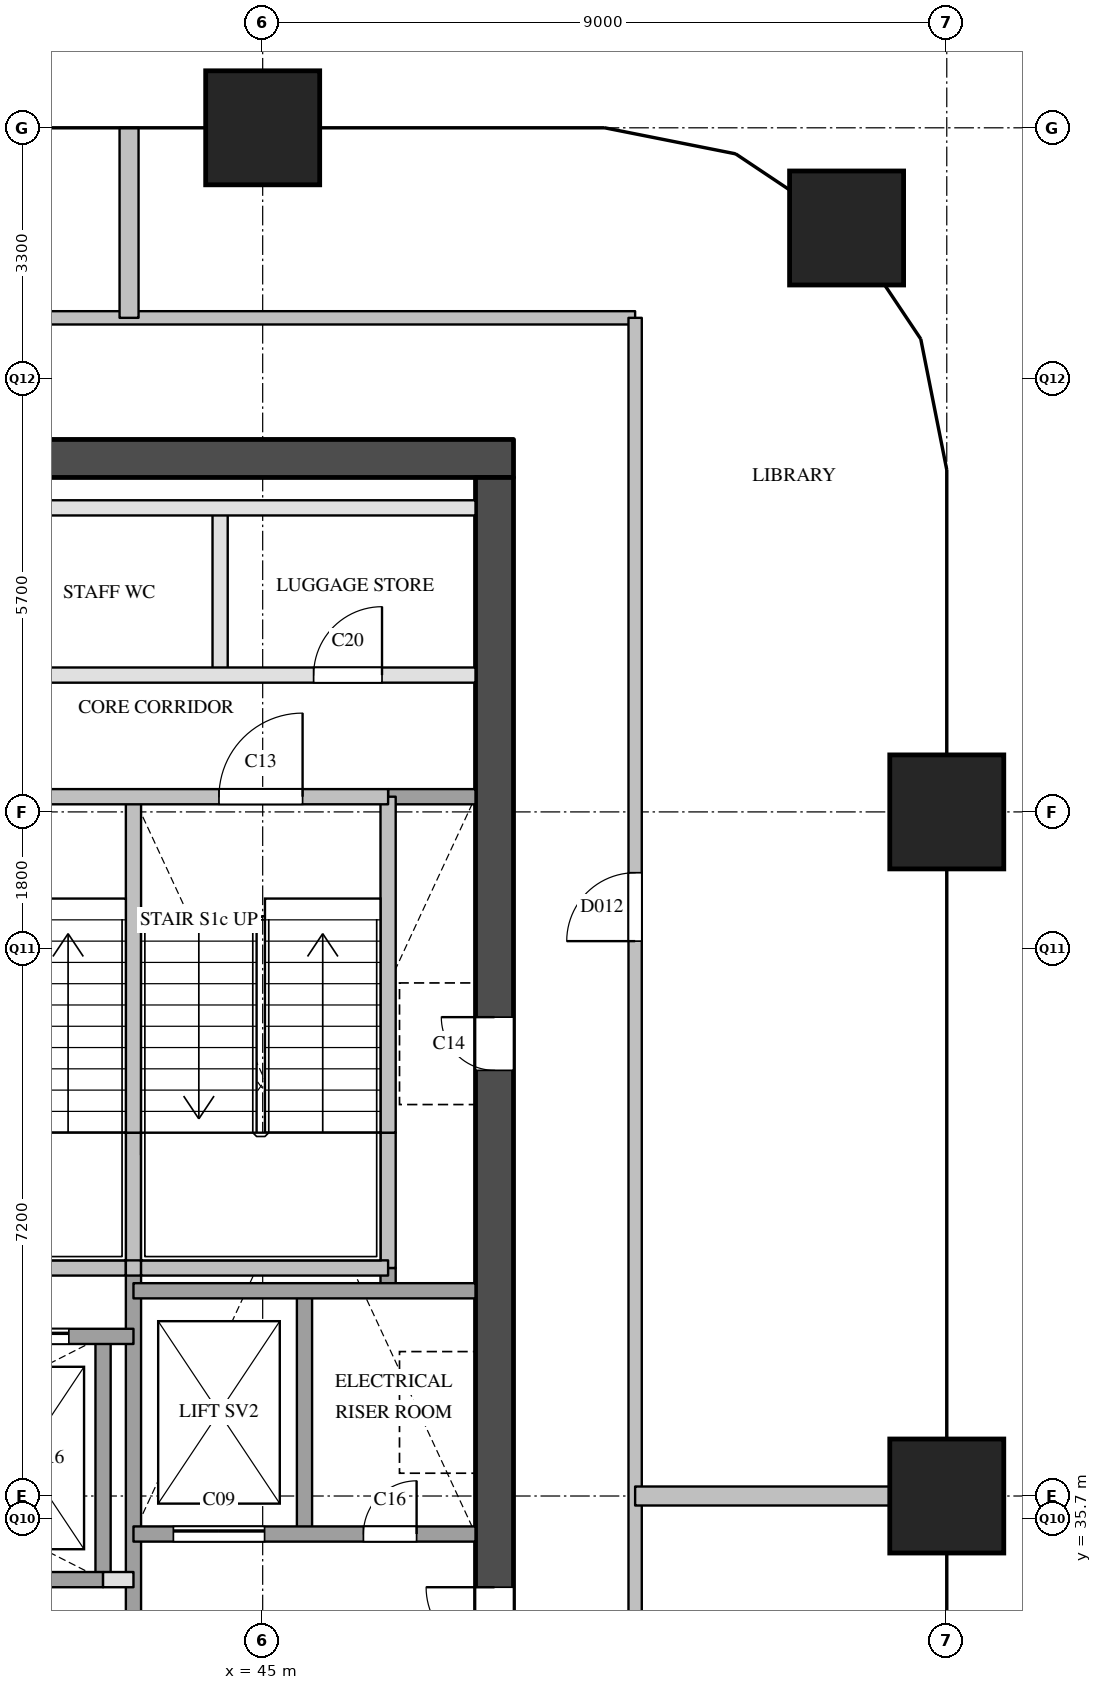
"""IFC4 building model, lengths in metres.
Left out: names, types, materials, properties, quantities, classifications, styles, units other than length and angle.
Written with IfcOpenShell. Run it as: python <this file> out.ifc"""

import sys

from ifc_helpers import new_model, si_unit, direction, frame, frame_2d, origin, origin_2d, place, context, subcontext, project, spatial, rectangle, extrude, element, fill, save


model = new_model("IFC4")
c1 = context("Model", 3, precision=1e-05, world=origin(), true_north=direction((0.0, 1.0)))
c2 = subcontext(c1, "Body", "Model", "MODEL_VIEW")
j1 = project(units=[si_unit("LENGTHUNIT", "METRE"), si_unit("PLANEANGLEUNIT", "RADIAN")], contexts=[c1])
p1 = place(None, origin())
s1 = spatial("IfcSite", under=j1, at=p1, CompositionType="ELEMENT")
p2 = place(p1, origin())
s2 = spatial("IfcBuilding", under=s1, at=p2, CompositionType="ELEMENT")
p3 = place(p2, frame((0.0, 0.0, 158.3)))
s3 = spatial("IfcBuildingStorey", under=s2, at=p3, CompositionType="ELEMENT", Elevation=158.3)
for number, where, z_axis, x_axis in (
    (1, (45.0, 54.0, 0.0), (0.0, 0.0, 1.0), (1.0, 0.0, 0.0)),
    (2, (54.0, 36.0, 0.0), (0.0, 0.0, 1.0), (1.0, 0.0, 0.0)),
    (3, (54.0, 45.0, 0.0), (0.0, 0.0, 1.0), (1.0, 0.0, 0.0)),
    (4, (52.682, 52.682, 0.0), (0.0, 0.0, 1.0), (1.0, 0.0, 0.0)),
):
    element("IfcColumn", number, at=place(p3, frame(where, z_axis=z_axis, x_axis=x_axis)), inside=s3, PredefinedType="COLUMN", context=c2, shape_type="SweptSolid", body=[
        extrude(rectangle(XDim=1.5, YDim=1.5, at=origin_2d()), origin(), (0.0, 0.0, 1.0), 3.9),
    ])
p4 = place(p3, frame((36.1, 49.65, 0.0), z_axis=(0.0, 0.0, 1.0), x_axis=(1.0, 0.0, 0.0)))
e5 = element("IfcWall", 5, at=p4, inside=s3, PredefinedType="SHEAR", context=c2, shape_type="SweptSolid", body=[
    extrude(rectangle(XDim=12.2, YDim=0.5, at=frame_2d((6.1, 0.0))), origin(), (0.0, 0.0, 1.0), 3.6),
])
p5 = place(p3, frame((48.05, 29.1, 0.0), z_axis=(0.0, 0.0, 1.0), x_axis=(0.0, 1.0, 0.0)))
e6 = element("IfcWall", 6, at=p5, inside=s3, PredefinedType="SHEAR", context=c2, shape_type="SweptSolid", body=[
    extrude(rectangle(XDim=20.3, YDim=0.5, at=frame_2d((10.15, 0.0))), origin(), (0.0, 0.0, 1.0), 3.6),
])
p6 = place(p5, frame((12.5, 0.0, 0.0)))
e7 = element("IfcOpeningElement", 7, at=p6, cuts=e6, PredefinedType="OPENING", context=c2, shape_type="SweptSolid", body=[
    extrude(rectangle(XDim=0.7, YDim=2.1, at=frame_2d((0.35, 1.05))), frame((0.0, 0.26, 0.0), z_axis=(0.0, -1.0, 0.0), x_axis=(1.0, 0.0, 0.0)), (0.0, 0.0, 1.0), 0.52),
])
p7 = place(p5, frame((3.9, 0.0, 0.0)))
e8 = element("IfcOpeningElement", 8, at=p7, cuts=e6, PredefinedType="OPENING", context=c2, shape_type="SweptSolid", body=[
    extrude(rectangle(XDim=1.8, YDim=2.1, at=frame_2d((0.9, 1.05))), frame((0.0, 0.26, 0.0), z_axis=(0.0, -1.0, 0.0), x_axis=(1.0, 0.0, 0.0)), (0.0, 0.0, 1.0), 0.52),
])
p8 = place(p3, frame((42.9, 34.9, 0.0), z_axis=(0.0, 0.0, 1.0), x_axis=(0.0, 1.0, 0.0)))
e9 = element("IfcWall", 9, at=p8, inside=s3, PredefinedType="SOLIDWALL", context=c2, shape_type="SweptSolid", body=[
    extrude(rectangle(XDim=3.2, YDim=0.2, at=frame_2d((1.6, 0.0))), origin(), (0.0, 0.0, 1.0), 3.6),
])
p9 = place(p3, frame((43.3, 29.1, 0.0), z_axis=(0.0, 0.0, 1.0), x_axis=(0.0, 1.0, 0.0)))
e10 = element("IfcWall", 10, at=p9, inside=s3, PredefinedType="SOLIDWALL", context=c2, shape_type="SweptSolid", body=[
    extrude(rectangle(XDim=9.9, YDim=0.2, at=frame_2d((4.95, 0.0))), origin(), (0.0, 0.0, 1.0), 3.6),
])
p10 = place(p3, frame((43.3, 39.0, 0.0), z_axis=(0.0, 0.0, 1.0), x_axis=(0.0, 1.0, 0.0)))
e11 = element("IfcWall", 11, at=p10, inside=s3, PredefinedType="SOLIDWALL", context=c2, shape_type="SweptSolid", body=[
    extrude(rectangle(XDim=1.78, YDim=0.2, at=frame_2d((0.89, 0.0))), origin(), (0.0, 0.0, 1.0), 3.6),
])
p11 = place(p3, frame((43.3, 40.78, 0.0), z_axis=(0.0, 0.0, 1.0), x_axis=(0.0, 1.0, 0.0)))
e12 = element("IfcWall", 12, at=p11, inside=s3, PredefinedType="SOLIDWALL", context=c2, shape_type="SweptSolid", body=[
    extrude(rectangle(XDim=4.42, YDim=0.2, at=frame_2d((2.21, 0.0))), origin(), (0.0, 0.0, 1.0), 3.6),
])
p12 = place(p3, frame((44.44, 46.8, 0.0), z_axis=(0.0, 0.0, 1.0), x_axis=(0.0, 1.0, 0.0)))
e13 = element("IfcWall", 13, at=p12, inside=s3, PredefinedType="PARTITIONING", context=c2, shape_type="SweptSolid", body=[
    extrude(rectangle(XDim=2.2, YDim=0.2, at=frame_2d((1.1, 0.0))), origin(), (0.0, 0.0, 1.0), 3.6),
])
p13 = place(p3, frame((45.55, 35.5, 0.0), z_axis=(0.0, 0.0, 1.0), x_axis=(0.0, 1.0, 0.0)))
e14 = element("IfcWall", 14, at=p13, inside=s3, PredefinedType="SOLIDWALL", context=c2, shape_type="SweptSolid", body=[
    extrude(rectangle(XDim=3.2, YDim=0.2, at=frame_2d((1.6, 0.0))), origin(), (0.0, 0.0, 1.0), 3.6),
])
p14 = place(p3, frame((46.65, 38.7, 0.0), z_axis=(0.0, 0.0, 1.0), x_axis=(0.0, 1.0, 0.0)))
e15 = element("IfcWall", 15, at=p14, inside=s3, PredefinedType="SOLIDWALL", context=c2, shape_type="SweptSolid", body=[
    extrude(rectangle(XDim=0.3, YDim=0.2, at=frame_2d((0.15, 0.0))), origin(), (0.0, 0.0, 1.0), 3.6),
])
p15 = place(p3, frame((46.65, 39.0, 0.0), z_axis=(0.0, 0.0, 1.0), x_axis=(0.0, 1.0, 0.0)))
e16 = element("IfcWall", 16, at=p15, inside=s3, PredefinedType="SOLIDWALL", context=c2, shape_type="SweptSolid", body=[
    extrude(rectangle(XDim=1.78, YDim=0.2, at=frame_2d((0.89, 0.0))), origin(), (0.0, 0.0, 1.0), 3.6),
])
p16 = place(p3, frame((46.65, 40.78, 0.0), z_axis=(0.0, 0.0, 1.0), x_axis=(0.0, 1.0, 0.0)))
e17 = element("IfcWall", 17, at=p16, inside=s3, PredefinedType="SOLIDWALL", context=c2, shape_type="SweptSolid", body=[
    extrude(rectangle(XDim=4.42, YDim=0.2, at=frame_2d((2.21, 0.0))), origin(), (0.0, 0.0, 1.0), 3.6),
])
p17 = place(p3, frame((42.9, 34.9, 0.0), z_axis=(0.0, 0.0, 1.0), x_axis=(1.0, 0.0, 0.0)))
e18 = element("IfcWall", 18, at=p17, inside=s3, PredefinedType="PARTITIONING", context=c2, shape_type="SweptSolid", body=[
    extrude(rectangle(XDim=0.4, YDim=0.2, at=frame_2d((0.2, 0.0))), origin(), (0.0, 0.0, 1.0), 3.6),
])
p18 = place(p3, frame((36.6, 34.9, 0.0), z_axis=(0.0, 0.0, 1.0), x_axis=(1.0, 0.0, 0.0)))
e19 = element("IfcWall", 19, at=p18, inside=s3, PredefinedType="SOLIDWALL", context=c2, shape_type="SweptSolid", body=[
    extrude(rectangle(XDim=6.3, YDim=0.2, at=frame_2d((3.15, 0.0))), origin(), (0.0, 0.0, 1.0), 3.6),
])
p19 = place(p3, frame((43.3, 35.5, 0.0), z_axis=(0.0, 0.0, 1.0), x_axis=(1.0, 0.0, 0.0)))
e20 = element("IfcWall", 20, at=p19, inside=s3, PredefinedType="SOLIDWALL", context=c2, shape_type="SweptSolid", body=[
    extrude(rectangle(XDim=4.5, YDim=0.2, at=frame_2d((2.25, 0.0))), origin(), (0.0, 0.0, 1.0), 3.6),
])
p20 = place(p19, frame((0.525, 0.0, 0.0)))
e21 = element("IfcOpeningElement", 21, at=p20, cuts=e20, PredefinedType="OPENING", context=c2, shape_type="SweptSolid", body=[
    extrude(rectangle(XDim=1.2, YDim=2.1, at=frame_2d((0.6, 1.05))), frame((0.0, 0.11, 0.0), z_axis=(0.0, -1.0, 0.0), x_axis=(1.0, 0.0, 0.0)), (0.0, 0.0, 1.0), 0.22),
])
p21 = place(p19, frame((3.025, 0.0, 0.0)))
e22 = element("IfcOpeningElement", 22, at=p21, cuts=e20, PredefinedType="OPENING", context=c2, shape_type="SweptSolid", body=[
    extrude(rectangle(XDim=0.7, YDim=2.1, at=frame_2d((0.35, 1.05))), frame((0.0, 0.11, 0.0), z_axis=(0.0, -1.0, 0.0), x_axis=(1.0, 0.0, 0.0)), (0.0, 0.0, 1.0), 0.22),
])
p22 = place(p3, frame((36.6, 38.1, 0.0), z_axis=(0.0, 0.0, 1.0), x_axis=(1.0, 0.0, 0.0)))
e23 = element("IfcWall", 23, at=p22, inside=s3, PredefinedType="SOLIDWALL", context=c2, shape_type="SweptSolid", body=[
    extrude(rectangle(XDim=6.7, YDim=0.2, at=frame_2d((3.35, 0.0))), origin(), (0.0, 0.0, 1.0), 3.6),
])
p23 = place(p22, frame((0.45, 0.0, 0.0)))
e24 = element("IfcOpeningElement", 24, at=p23, cuts=e23, PredefinedType="OPENING", context=c2, shape_type="SweptSolid", body=[
    extrude(rectangle(XDim=1.2, YDim=2.1, at=frame_2d((0.6, 1.05))), frame((0.0, 0.11, 0.0), z_axis=(0.0, -1.0, 0.0), x_axis=(1.0, 0.0, 0.0)), (0.0, 0.0, 1.0), 0.22),
])
p24 = place(p22, frame((2.55, 0.0, 0.0)))
e25 = element("IfcOpeningElement", 25, at=p24, cuts=e23, PredefinedType="OPENING", context=c2, shape_type="SweptSolid", body=[
    extrude(rectangle(XDim=1.2, YDim=2.1, at=frame_2d((0.6, 1.05))), frame((0.0, 0.11, 0.0), z_axis=(0.0, -1.0, 0.0), x_axis=(1.0, 0.0, 0.0)), (0.0, 0.0, 1.0), 0.22),
])
p25 = place(p22, frame((4.65, 0.0, 0.0)))
e26 = element("IfcOpeningElement", 26, at=p25, cuts=e23, PredefinedType="OPENING", context=c2, shape_type="SweptSolid", body=[
    extrude(rectangle(XDim=1.2, YDim=2.1, at=frame_2d((0.6, 1.05))), frame((0.0, 0.11, 0.0), z_axis=(0.0, -1.0, 0.0), x_axis=(1.0, 0.0, 0.0)), (0.0, 0.0, 1.0), 0.22),
])
p26 = place(p3, frame((43.3, 38.7, 0.0), z_axis=(0.0, 0.0, 1.0), x_axis=(1.0, 0.0, 0.0)))
e27 = element("IfcWall", 27, at=p26, inside=s3, PredefinedType="SOLIDWALL", context=c2, shape_type="SweptSolid", body=[
    extrude(rectangle(XDim=4.5, YDim=0.2, at=frame_2d((2.25, 0.0))), origin(), (0.0, 0.0, 1.0), 3.6),
])
p27 = place(p3, frame((40.05, 39.0, 0.0), z_axis=(0.0, 0.0, 1.0), x_axis=(1.0, 0.0, 0.0)))
e28 = element("IfcWall", 28, at=p27, inside=s3, PredefinedType="SOLIDWALL", context=c2, shape_type="SweptSolid", body=[
    extrude(rectangle(XDim=3.15, YDim=0.2, at=frame_2d((1.575, 0.0))), origin(), (0.0, 0.0, 1.0), 3.6),
])
p28 = place(p3, frame((43.2, 39.0, 0.0), z_axis=(0.0, 0.0, 1.0), x_axis=(1.0, 0.0, 0.0)))
e29 = element("IfcWall", 29, at=p28, inside=s3, PredefinedType="SOLIDWALL", context=c2, shape_type="SweptSolid", body=[
    extrude(rectangle(XDim=0.2, YDim=0.2, at=frame_2d((0.1, 0.0))), origin(), (0.0, 0.0, 1.0), 3.6),
])
p29 = place(p3, frame((43.4, 39.0, 0.0), z_axis=(0.0, 0.0, 1.0), x_axis=(1.0, 0.0, 0.0)))
e30 = element("IfcWall", 30, at=p29, inside=s3, PredefinedType="SOLIDWALL", context=c2, shape_type="SweptSolid", body=[
    extrude(rectangle(XDim=3.25, YDim=0.2, at=frame_2d((1.625, 0.0))), origin(), (0.0, 0.0, 1.0), 3.6),
])
p30 = place(p3, frame((46.65, 45.2, 0.0), z_axis=(0.0, 0.0, 1.0), x_axis=(1.0, 0.0, 0.0)))
e31 = element("IfcWall", 31, at=p30, inside=s3, PredefinedType="SOLIDWALL", context=c2, shape_type="SweptSolid", body=[
    extrude(rectangle(XDim=1.15, YDim=0.2, at=frame_2d((0.575, 0.0))), origin(), (0.0, 0.0, 1.0), 3.6),
])
p31 = place(p3, frame((36.6, 45.2, 0.0), z_axis=(0.0, 0.0, 1.0), x_axis=(1.0, 0.0, 0.0)))
e32 = element("IfcWall", 32, at=p31, inside=s3, PredefinedType="SOLIDWALL", context=c2, shape_type="SweptSolid", body=[
    extrude(rectangle(XDim=10.05, YDim=0.2, at=frame_2d((5.025, 0.0))), origin(), (0.0, 0.0, 1.0), 3.6),
])
p32 = place(p31, frame((1.125, 0.0, 0.0)))
e33 = element("IfcOpeningElement", 33, at=p32, cuts=e32, PredefinedType="OPENING", context=c2, shape_type="SweptSolid", body=[
    extrude(rectangle(XDim=1.1, YDim=2.1, at=frame_2d((0.55, 1.05))), frame((0.0, 0.11, 0.0), z_axis=(0.0, -1.0, 0.0), x_axis=(1.0, 0.0, 0.0)), (0.0, 0.0, 1.0), 0.22),
])
p33 = place(p31, frame((4.475, 0.0, 0.0)))
e34 = element("IfcOpeningElement", 34, at=p33, cuts=e32, PredefinedType="OPENING", context=c2, shape_type="SweptSolid", body=[
    extrude(rectangle(XDim=1.1, YDim=2.1, at=frame_2d((0.55, 1.05))), frame((0.0, 0.11, 0.0), z_axis=(0.0, -1.0, 0.0), x_axis=(1.0, 0.0, 0.0)), (0.0, 0.0, 1.0), 0.22),
])
p34 = place(p31, frame((7.825, 0.0, 0.0)))
e35 = element("IfcOpeningElement", 35, at=p34, cuts=e32, PredefinedType="OPENING", context=c2, shape_type="SweptSolid", body=[
    extrude(rectangle(XDim=1.1, YDim=2.1, at=frame_2d((0.55, 1.05))), frame((0.0, 0.11, 0.0), z_axis=(0.0, -1.0, 0.0), x_axis=(1.0, 0.0, 0.0)), (0.0, 0.0, 1.0), 0.22),
])
p35 = place(p3, frame((36.6, 46.8, 0.0), z_axis=(0.0, 0.0, 1.0), x_axis=(1.0, 0.0, 0.0)))
e36 = element("IfcWall", 36, at=p35, inside=s3, PredefinedType="PARTITIONING", context=c2, shape_type="SweptSolid", body=[
    extrude(rectangle(XDim=11.2, YDim=0.2, at=frame_2d((5.6, 0.0))), origin(), (0.0, 0.0, 1.0), 3.6),
])
p36 = place(p35, frame((0.67, 0.0, 0.0)))
e37 = element("IfcOpeningElement", 37, at=p36, cuts=e36, PredefinedType="OPENING", context=c2, shape_type="SweptSolid", body=[
    extrude(rectangle(XDim=0.9, YDim=2.1, at=frame_2d((0.45, 1.05))), frame((0.0, 0.11, 0.0), z_axis=(0.0, -1.0, 0.0), x_axis=(1.0, 0.0, 0.0)), (0.0, 0.0, 1.0), 0.22),
])
p37 = place(p35, frame((4.59, 0.0, 0.0)))
e38 = element("IfcOpeningElement", 38, at=p37, cuts=e36, PredefinedType="OPENING", context=c2, shape_type="SweptSolid", body=[
    extrude(rectangle(XDim=0.9, YDim=2.1, at=frame_2d((0.45, 1.05))), frame((0.0, 0.11, 0.0), z_axis=(0.0, -1.0, 0.0), x_axis=(1.0, 0.0, 0.0)), (0.0, 0.0, 1.0), 0.22),
])
p38 = place(p35, frame((9.07, 0.0, 0.0)))
e39 = element("IfcOpeningElement", 39, at=p38, cuts=e36, PredefinedType="OPENING", context=c2, shape_type="SweptSolid", body=[
    extrude(rectangle(XDim=0.9, YDim=2.1, at=frame_2d((0.45, 1.05))), frame((0.0, 0.11, 0.0), z_axis=(0.0, -1.0, 0.0), x_axis=(1.0, 0.0, 0.0)), (0.0, 0.0, 1.0), 0.22),
])
p39 = place(p3, frame((36.6, 49.0, 0.0), z_axis=(0.0, 0.0, 1.0), x_axis=(1.0, 0.0, 0.0)))
e40 = element("IfcWall", 40, at=p39, inside=s3, PredefinedType="PARTITIONING", context=c2, shape_type="SweptSolid", body=[
    extrude(rectangle(XDim=11.2, YDim=0.2, at=frame_2d((5.6, 0.0))), origin(), (0.0, 0.0, 1.0), 3.6),
])
p40 = place(p3, frame((34.5, 51.5, 0.0), z_axis=(0.0, 0.0, 1.0), x_axis=(1.0, 0.0, 0.0)))
e41 = element("IfcWall", 41, at=p40, inside=s3, PredefinedType="PARTITIONING", context=c2, shape_type="SweptSolid", body=[
    extrude(rectangle(XDim=15.4, YDim=0.175, at=frame_2d((7.7, 0.0))), origin(), (0.0, 0.0, 1.0), 3.6),
])
p41 = place(p3, frame((49.9, 28.5, 0.0), z_axis=(0.0, 0.0, 1.0), x_axis=(0.0, 1.0, 0.0)))
e42 = element("IfcWall", 42, at=p41, inside=s3, PredefinedType="PARTITIONING", context=c2, shape_type="SweptSolid", body=[
    extrude(rectangle(XDim=23.0, YDim=0.175, at=frame_2d((11.5, 0.0))), origin(), (0.0, 0.0, 1.0), 3.6),
])
p42 = place(p41, frame((3.3, 0.0, 0.0)))
e43 = element("IfcOpeningElement", 43, at=p42, cuts=e42, PredefinedType="OPENING", context=c2, shape_type="SweptSolid", body=[
    extrude(rectangle(XDim=0.9, YDim=2.1, at=frame_2d((0.45, 1.05))), frame((0.0, 0.097, 0.0), z_axis=(0.0, -1.0, 0.0), x_axis=(1.0, 0.0, 0.0)), (0.0, 0.0, 1.0), 0.195),
])
p43 = place(p41, frame((14.8, 0.0, 0.0)))
e44 = element("IfcOpeningElement", 44, at=p43, cuts=e42, PredefinedType="OPENING", context=c2, shape_type="SweptSolid", body=[
    extrude(rectangle(XDim=0.9, YDim=2.1, at=frame_2d((0.45, 1.05))), frame((0.0, 0.097, 0.0), z_axis=(0.0, -1.0, 0.0), x_axis=(1.0, 0.0, 0.0)), (0.0, 0.0, 1.0), 0.195),
])
p44 = place(p3, frame((49.9, 36.0, 0.0), z_axis=(0.0, 0.0, 1.0), x_axis=(1.0, 0.0, 0.0)))
e45 = element("IfcWall", 45, at=p44, inside=s3, PredefinedType="PARTITIONING", context=c2, shape_type="SweptSolid", body=[
    extrude(rectangle(XDim=4.1, YDim=0.25, at=frame_2d((2.05, 0.0))), origin(), (0.0, 0.0, 1.0), 3.6),
])
p45 = place(p3, frame((43.242, 51.5, 0.0), z_axis=(0.0, 0.0, 1.0), x_axis=(0.0, 1.0, 0.0)))
e46 = element("IfcWall", 46, at=p45, inside=s3, PredefinedType="PARTITIONING", context=c2, shape_type="SweptSolid", body=[
    extrude(rectangle(XDim=2.5, YDim=0.25, at=frame_2d((1.25, 0.0))), origin(), (0.0, 0.0, 1.0), 2.6),
])
p46 = place(p25, origin())
e47 = element("IfcDoor", 47, at=p46, inside=s3, OperationType="SLIDING_TO_LEFT", PredefinedType="DOOR", context=c2, shape_type="SweptSolid", body=[
    extrude(rectangle(XDim=1.2, YDim=2.1, at=frame_2d((0.6, 1.05))), frame((0.0, 0.025, 0.0), z_axis=(0.0, -1.0, 0.0), x_axis=(1.0, 0.0, 0.0)), (0.0, 0.0, 1.0), 0.05),
])
fill(e26, e47)
p47 = place(p20, origin())
e48 = element("IfcDoor", 48, at=p47, inside=s3, OperationType="SLIDING_TO_LEFT", PredefinedType="DOOR", context=c2, shape_type="SweptSolid", body=[
    extrude(rectangle(XDim=1.2, YDim=2.1, at=frame_2d((0.6, 1.05))), frame((0.0, 0.025, 0.0), z_axis=(0.0, -1.0, 0.0), x_axis=(1.0, 0.0, 0.0)), (0.0, 0.0, 1.0), 0.05),
])
fill(e21, e48)
p48 = place(p34, origin())
e49 = element("IfcDoor", 49, at=p48, inside=s3, OperationType="SINGLE_SWING_RIGHT", PredefinedType="DOOR", context=c2, shape_type="SweptSolid", body=[
    extrude(rectangle(XDim=1.1, YDim=2.1, at=frame_2d((0.55, 1.05))), frame((0.0, 0.025, 0.0), z_axis=(0.0, -1.0, 0.0), x_axis=(1.0, 0.0, 0.0)), (0.0, 0.0, 1.0), 0.05),
])
fill(e35, e49)
p49 = place(p6, origin())
e50 = element("IfcDoor", 50, at=p49, inside=s3, OperationType="SINGLE_SWING_RIGHT", PredefinedType="DOOR", context=c2, shape_type="SweptSolid", body=[
    extrude(rectangle(XDim=0.7, YDim=2.1, at=frame_2d((0.35, 1.05))), frame((0.0, 0.025, 0.0), z_axis=(0.0, -1.0, 0.0), x_axis=(1.0, 0.0, 0.0)), (0.0, 0.0, 1.0), 0.05),
])
fill(e7, e50)
p50 = place(p7, origin())
e51 = element("IfcDoor", 51, at=p50, inside=s3, OperationType="DOUBLE_DOOR_SINGLE_SWING", PredefinedType="DOOR", context=c2, shape_type="SweptSolid", body=[
    extrude(rectangle(XDim=1.8, YDim=2.1, at=frame_2d((0.9, 1.05))), frame((0.0, 0.025, 0.0), z_axis=(0.0, -1.0, 0.0), x_axis=(1.0, 0.0, 0.0)), (0.0, 0.0, 1.0), 0.05),
])
fill(e8, e51)
p51 = place(p21, origin())
e52 = element("IfcDoor", 52, at=p51, inside=s3, OperationType="SINGLE_SWING_RIGHT", PredefinedType="DOOR", context=c2, shape_type="SweptSolid", body=[
    extrude(rectangle(XDim=0.7, YDim=2.1, at=frame_2d((0.35, 1.05))), frame((0.0, 0.025, 0.0), z_axis=(0.0, -1.0, 0.0), x_axis=(1.0, 0.0, 0.0)), (0.0, 0.0, 1.0), 0.05),
])
fill(e22, e52)
p52 = place(p38, origin())
e53 = element("IfcDoor", 53, at=p52, inside=s3, OperationType="SINGLE_SWING_RIGHT", PredefinedType="DOOR", context=c2, shape_type="SweptSolid", body=[
    extrude(rectangle(XDim=0.9, YDim=2.1, at=frame_2d((0.45, 1.05))), frame((0.0, 0.025, 0.0), z_axis=(0.0, -1.0, 0.0), x_axis=(1.0, 0.0, 0.0)), (0.0, 0.0, 1.0), 0.05),
])
fill(e39, e53)
p53 = place(p43, origin())
e54 = element("IfcDoor", 54, at=p53, inside=s3, OperationType="SINGLE_SWING_LEFT", PredefinedType="DOOR", context=c2, shape_type="SweptSolid", body=[
    extrude(rectangle(XDim=0.9, YDim=2.1, at=frame_2d((0.45, 1.05))), frame((0.0, 0.025, 0.0), z_axis=(0.0, -1.0, 0.0), x_axis=(1.0, 0.0, 0.0)), (0.0, 0.0, 1.0), 0.05),
])
fill(e44, e54)
save(model, sys.argv[1])
